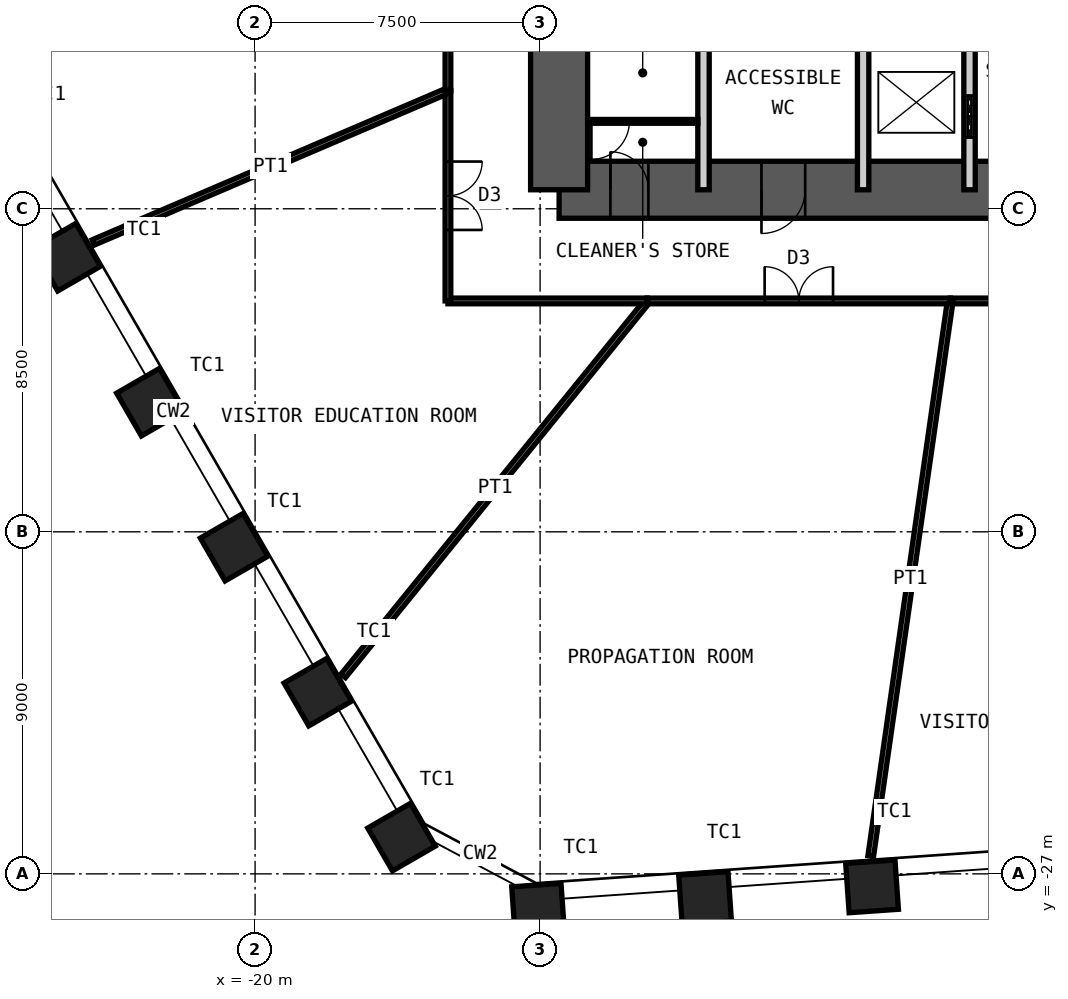
"""IFC4 building model, lengths in metres.
Left out: names, types, materials, properties, quantities, classifications, styles, units other than length and angle.
Written with IfcOpenShell. Run it as: python <this file> out.ifc"""

import sys

from ifc_helpers import new_model, si_unit, direction, frame, frame_2d, origin, origin_2d, place, context, subcontext, project, spatial, rectangle, hollow_rectangle, extrude, element, fill, save


model = new_model("IFC4")
c1 = context("Model", 3, precision=1e-05, world=origin(), true_north=direction((0.0, 1.0)))
c2 = subcontext(c1, "Body", "Model", "MODEL_VIEW")
j1 = project(units=[si_unit("LENGTHUNIT", "METRE"), si_unit("PLANEANGLEUNIT", "RADIAN")], contexts=[c1])
p1 = place(None, origin())
s1 = spatial("IfcSite", under=j1, at=p1, CompositionType="ELEMENT")
p2 = place(p1, origin())
s2 = spatial("IfcBuilding", under=s1, at=p2, CompositionType="ELEMENT")
p3 = place(p2, frame((0.0, 0.0, 22.0)))
s3 = spatial("IfcBuildingStorey", under=s2, at=p3, CompositionType="ELEMENT", Elevation=22.0)
for number, where, z_axis, x_axis in (
    (1, (-3.765, -27.329, 0.0), (0.0, 0.0, 1.0), (0.998, 0.07, 0.0)),
    (2, (-8.159, -27.636, 0.0), (0.0, 0.0, 1.0), (0.998, 0.07, 0.0)),
    (3, (-12.553, -27.944, 0.0), (0.0, 0.0, 1.0), (0.998, 0.07, 0.0)),
    (4, (-16.147, -26.033, 0.0), (0.0, 0.0, 1.0), (0.5, -0.866, 0.0)),
    (5, (-18.349, -22.218, 0.0), (0.0, 0.0, 1.0), (0.5, -0.866, 0.0)),
    (6, (-20.552, -18.404, 0.0), (0.0, 0.0, 1.0), (0.5, -0.866, 0.0)),
    (7, (-22.754, -14.589, 0.0), (0.0, 0.0, 1.0), (0.5, -0.866, 0.0)),
    (8, (-24.956, -10.775, 0.0), (0.0, 0.0, 1.0), (0.5, -0.866, 0.0)),
):
    element("IfcColumn", number, at=place(p3, frame(where, z_axis=z_axis, x_axis=x_axis)), inside=s3, PredefinedType="COLUMN", context=c2, shape_type="SweptSolid", body=[
        extrude(hollow_rectangle(XDim=1.3, YDim=1.3, WallThickness=0.1, at=origin_2d()), origin(), (0.0, 0.0, 1.0), 5.0),
    ])
p4 = place(p3, frame((-12.0, -9.0, 0.0), z_axis=(0.0, 0.0, 1.0), x_axis=(1.0, 0.0, 0.0)))
e9 = element("IfcWall", 9, at=p4, inside=s3, PredefinedType="SHEAR", context=c2, shape_type="SweptSolid", body=[
    extrude(rectangle(XDim=24.0, YDim=1.5, at=frame_2d((12.0, 0.0))), origin(), (0.0, 0.0, 1.0), 5.0),
])
p5 = place(p4, frame((1.35, 0.0, 0.0)))
e10 = element("IfcOpeningElement", 10, at=p5, cuts=e9, PredefinedType="OPENING", context=c2, shape_type="SweptSolid", body=[
    extrude(rectangle(XDim=1.0, YDim=2.1, at=frame_2d((0.5, 1.05))), frame((0.0, 0.76, 0.0), z_axis=(0.0, -1.0, 0.0), x_axis=(1.0, 0.0, 0.0)), (0.0, 0.0, 1.0), 1.52),
])
p6 = place(p4, frame((5.325, 0.0, 0.0)))
e11 = element("IfcOpeningElement", 11, at=p6, cuts=e9, PredefinedType="OPENING", context=c2, shape_type="SweptSolid", body=[
    extrude(rectangle(XDim=1.15, YDim=2.1, at=frame_2d((0.575, 1.05))), frame((0.0, 0.76, 0.0), z_axis=(0.0, -1.0, 0.0), x_axis=(1.0, 0.0, 0.0)), (0.0, 0.0, 1.0), 1.52),
])
p7 = place(p4, frame((12.6, 0.0, 0.0)))
e12 = element("IfcOpeningElement", 12, at=p7, cuts=e9, PredefinedType="OPENING", context=c2, shape_type="SweptSolid", body=[
    extrude(rectangle(XDim=1.0, YDim=2.1, at=frame_2d((0.5, 1.05))), frame((0.0, 0.76, 0.0), z_axis=(0.0, -1.0, 0.0), x_axis=(1.0, 0.0, 0.0)), (0.0, 0.0, 1.0), 1.52),
])
p8 = place(p3, frame((-12.0, -9.0, 0.0), z_axis=(0.0, 0.0, 1.0), x_axis=(0.0, 1.0, 0.0)))
e13 = element("IfcWall", 13, at=p8, inside=s3, PredefinedType="SHEAR", context=c2, shape_type="SweptSolid", body=[
    extrude(rectangle(XDim=18.0, YDim=1.5, at=frame_2d((9.0, 0.0))), origin(), (0.0, 0.0, 1.0), 5.0),
])
p9 = place(p8, frame((8.1, 0.0, 0.0)))
e14 = element("IfcOpeningElement", 14, at=p9, cuts=e13, PredefinedType="OPENING", context=c2, shape_type="SweptSolid", body=[
    extrude(rectangle(XDim=1.8, YDim=2.1, at=frame_2d((0.9, 1.05))), frame((0.0, 0.76, 0.0), z_axis=(0.0, -1.0, 0.0), x_axis=(1.0, 0.0, 0.0)), (0.0, 0.0, 1.0), 1.52),
])
for number, where, z_axis, x_axis in (
    (15, (-8.2, -9.0, 0.0), (0.0, 0.0, 1.0), (0.0, 1.0, 0.0)),
    (16, (-4.0, -9.0, 0.0), (0.0, 0.0, 1.0), (0.0, 1.0, 0.0)),
):
    element("IfcWall", number, at=place(p3, frame(where, z_axis=z_axis, x_axis=x_axis)), inside=s3, PredefinedType="PARTITIONING", context=c2, shape_type="SweptSolid", body=[
        extrude(rectangle(XDim=3.85, YDim=0.3, at=frame_2d((1.925, 0.0))), origin(), (0.0, 0.0, 1.0), 4.78),
    ])
p10 = place(p3, frame((-1.2, -9.0, 0.0), z_axis=(0.0, 0.0, 1.0), x_axis=(0.0, 1.0, 0.0)))
e17 = element("IfcWall", 17, at=p10, inside=s3, PredefinedType="PARTITIONING", context=c2, shape_type="SweptSolid", body=[
    extrude(rectangle(XDim=3.85, YDim=0.3, at=frame_2d((1.925, 0.0))), origin(), (0.0, 0.0, 1.0), 4.78),
])
p11 = place(p10, frame((1.375, 0.0, 0.0)))
e18 = element("IfcOpeningElement", 18, at=p11, cuts=e17, PredefinedType="OPENING", context=c2, shape_type="SweptSolid", body=[
    extrude(rectangle(XDim=1.1, YDim=2.4, at=frame_2d((0.55, 1.2))), frame((0.0, 0.16, 0.0), z_axis=(0.0, -1.0, 0.0), x_axis=(1.0, 0.0, 0.0)), (0.0, 0.0, 1.0), 0.32),
])
p12 = place(p3, frame((-11.25, -7.2, 0.0), z_axis=(0.0, 0.0, 1.0), x_axis=(1.0, 0.0, 0.0)))
e19 = element("IfcWall", 19, at=p12, inside=s3, PredefinedType="PARTITIONING", context=c2, shape_type="SweptSolid", body=[
    extrude(rectangle(XDim=2.9, YDim=0.1, at=frame_2d((1.45, 0.0))), origin(), (0.0, 0.0, 1.0), 4.78),
])
p13 = place(p12, frame((0.1, 0.0, 0.0)))
e20 = element("IfcOpeningElement", 20, at=p13, cuts=e19, PredefinedType="OPENING", context=c2, shape_type="SweptSolid", body=[
    extrude(rectangle(XDim=1.0, YDim=2.4, at=frame_2d((0.5, 1.2))), frame((0.0, 0.06, 0.0), z_axis=(0.0, -1.0, 0.0), x_axis=(1.0, 0.0, 0.0)), (0.0, 0.0, 1.0), 0.12),
])
p14 = place(p3, frame((-17.68, -21.791, 0.0), z_axis=(0.0, 0.0, 1.0), x_axis=(0.630056381531, 0.776549390633, 0.0)))
e21 = element("IfcWall", 21, at=p14, inside=s3, PredefinedType="PARTITIONING", context=c2, shape_type="SweptSolid", body=[
    extrude(rectangle(XDim=12.704, YDim=0.15, at=frame_2d((6.352, 0.0))), origin(), (0.0, 0.0, 1.0), 3.7),
])
p15 = place(p3, frame((-9.676, -11.925, 0.0), z_axis=(0.0, 0.0, 1.0), x_axis=(-1.0, 0.0, 0.0)))
e22 = element("IfcWall", 22, at=p15, inside=s3, PredefinedType="PARTITIONING", context=c2, shape_type="SweptSolid", body=[
    extrude(rectangle(XDim=5.25, YDim=0.15, at=frame_2d((2.625, 0.0))), origin(), (0.0, 0.0, 1.0), 4.8),
])
p16 = place(p3, frame((-14.925, -11.925, 0.0), z_axis=(0.0, 0.0, 1.0), x_axis=(0.0, 1.0, 0.0)))
e23 = element("IfcWall", 23, at=p16, inside=s3, PredefinedType="PARTITIONING", context=c2, shape_type="SweptSolid", body=[
    extrude(rectangle(XDim=5.535, YDim=0.15, at=frame_2d((2.768, 0.0))), origin(), (0.0, 0.0, 1.0), 4.8),
])
p17 = place(p16, frame((1.868, 0.0, 0.0)))
e24 = element("IfcOpeningElement", 24, at=p17, cuts=e23, PredefinedType="OPENING", context=c2, shape_type="SweptSolid", body=[
    extrude(rectangle(XDim=1.8, YDim=2.4, at=frame_2d((0.9, 1.2))), frame((0.0, 0.085, 0.0), z_axis=(0.0, -1.0, 0.0), x_axis=(1.0, 0.0, 0.0)), (0.0, 0.0, 1.0), 0.17),
])
p18 = place(p3, frame((-24.258, -10.385, 0.0), z_axis=(0.0, 0.0, 1.0), x_axis=(0.9192967113, 0.393565187222, 0.0)))
e25 = element("IfcWall", 25, at=p18, inside=s3, PredefinedType="PARTITIONING", context=c2, shape_type="SweptSolid", body=[
    extrude(rectangle(XDim=10.152, YDim=0.15, at=frame_2d((5.076, 0.0))), origin(), (0.0, 0.0, 1.0), 3.7),
])
p19 = place(p3, frame((-14.925, -6.39, 0.0), z_axis=(0.0, 0.0, 1.0), x_axis=(0.0, 1.0, 0.0)))
e26 = element("IfcWall", 26, at=p19, inside=s3, PredefinedType="PARTITIONING", context=c2, shape_type="SweptSolid", body=[
    extrude(rectangle(XDim=9.016, YDim=0.15, at=frame_2d((4.508, 0.0))), origin(), (0.0, 0.0, 1.0), 4.8),
])
p20 = place(p19, frame((3.608, 0.0, 0.0)))
e27 = element("IfcOpeningElement", 27, at=p20, cuts=e26, PredefinedType="OPENING", context=c2, shape_type="SweptSolid", body=[
    extrude(rectangle(XDim=1.8, YDim=2.4, at=frame_2d((0.9, 1.2))), frame((0.0, 0.085, 0.0), z_axis=(0.0, -1.0, 0.0), x_axis=(1.0, 0.0, 0.0)), (0.0, 0.0, 1.0), 0.17),
])
p21 = place(p3, frame((2.28, -11.925, 0.0), z_axis=(0.0, 0.0, 1.0), x_axis=(-1.0, 0.0, 0.0)))
e28 = element("IfcWall", 28, at=p21, inside=s3, PredefinedType="PARTITIONING", context=c2, shape_type="SweptSolid", body=[
    extrude(rectangle(XDim=3.988, YDim=0.15, at=frame_2d((1.994, 0.0))), origin(), (0.0, 0.0, 1.0), 4.8),
])
p22 = place(p21, frame((1.494, 0.0, 0.0)))
e29 = element("IfcOpeningElement", 29, at=p22, cuts=e28, PredefinedType="OPENING", context=c2, shape_type="SweptSolid", body=[
    extrude(rectangle(XDim=1.0, YDim=2.4, at=frame_2d((0.5, 1.2))), frame((0.0, 0.085, 0.0), z_axis=(0.0, -1.0, 0.0), x_axis=(1.0, 0.0, 0.0)), (0.0, 0.0, 1.0), 0.17),
])
p23 = place(p3, frame((-3.8, -26.532, 0.0), z_axis=(0.0, 0.0, 1.0), x_axis=(0.141775745175, 0.989898801939, 0.0)))
e30 = element("IfcWall", 30, at=p23, inside=s3, PredefinedType="PARTITIONING", context=c2, shape_type="SweptSolid", body=[
    extrude(rectangle(XDim=14.756, YDim=0.15, at=frame_2d((7.378, 0.0))), origin(), (0.0, 0.0, 1.0), 3.7),
])
p24 = place(p3, frame((-1.708, -11.925, 0.0), z_axis=(0.0, 0.0, 1.0), x_axis=(-1.0, 0.0, 0.0)))
e31 = element("IfcWall", 31, at=p24, inside=s3, PredefinedType="PARTITIONING", context=c2, shape_type="SweptSolid", body=[
    extrude(rectangle(XDim=7.968, YDim=0.15, at=frame_2d((3.984, 0.0))), origin(), (0.0, 0.0, 1.0), 4.8),
])
p25 = place(p24, frame((3.084, 0.0, 0.0)))
e32 = element("IfcOpeningElement", 32, at=p25, cuts=e31, PredefinedType="OPENING", context=c2, shape_type="SweptSolid", body=[
    extrude(rectangle(XDim=1.8, YDim=2.4, at=frame_2d((0.9, 1.2))), frame((0.0, 0.085, 0.0), z_axis=(0.0, -1.0, 0.0), x_axis=(1.0, 0.0, 0.0)), (0.0, 0.0, 1.0), 0.17),
])
p26 = place(p5, origin())
e33 = element("IfcDoor", 33, at=p26, inside=s3, OperationType="SINGLE_SWING_RIGHT", PredefinedType="DOOR", context=c2, shape_type="SweptSolid", body=[
    extrude(rectangle(XDim=1.0, YDim=2.1, at=frame_2d((0.5, 1.05))), frame((0.0, 0.025, 0.0), z_axis=(0.0, -1.0, 0.0), x_axis=(1.0, 0.0, 0.0)), (0.0, 0.0, 1.0), 0.05),
])
fill(e10, e33)
p27 = place(p6, origin())
e34 = element("IfcDoor", 34, at=p27, inside=s3, OperationType="SINGLE_SWING_LEFT", PredefinedType="DOOR", context=c2, shape_type="SweptSolid", body=[
    extrude(rectangle(XDim=1.15, YDim=2.1, at=frame_2d((0.575, 1.05))), frame((0.0, 0.025, 0.0), z_axis=(0.0, -1.0, 0.0), x_axis=(1.0, 0.0, 0.0)), (0.0, 0.0, 1.0), 0.05),
])
fill(e11, e34)
p28 = place(p11, origin())
e35 = element("IfcDoor", 35, at=p28, inside=s3, OperationType="DOUBLE_DOOR_SLIDING", PredefinedType="DOOR", context=c2, shape_type="SweptSolid", body=[
    extrude(rectangle(XDim=1.1, YDim=2.4, at=frame_2d((0.55, 1.2))), frame((0.0, 0.025, 0.0), z_axis=(0.0, -1.0, 0.0), x_axis=(1.0, 0.0, 0.0)), (0.0, 0.0, 1.0), 0.05),
])
fill(e18, e35)
p29 = place(p13, origin())
e36 = element("IfcDoor", 36, at=p29, inside=s3, OperationType="SINGLE_SWING_LEFT", PredefinedType="DOOR", context=c2, shape_type="SweptSolid", body=[
    extrude(rectangle(XDim=1.0, YDim=2.4, at=frame_2d((0.5, 1.2))), frame((0.0, 0.025, 0.0), z_axis=(0.0, -1.0, 0.0), x_axis=(1.0, 0.0, 0.0)), (0.0, 0.0, 1.0), 0.05),
])
fill(e20, e36)
p30 = place(p17, origin())
e37 = element("IfcDoor", 37, at=p30, inside=s3, OperationType="DOUBLE_DOOR_DOUBLE_SWING", PredefinedType="DOOR", context=c2, shape_type="SweptSolid", body=[
    extrude(rectangle(XDim=1.8, YDim=2.4, at=frame_2d((0.9, 1.2))), frame((0.0, 0.025, 0.0), z_axis=(0.0, -1.0, 0.0), x_axis=(1.0, 0.0, 0.0)), (0.0, 0.0, 1.0), 0.05),
])
fill(e24, e37)
p31 = place(p25, origin())
e38 = element("IfcDoor", 38, at=p31, inside=s3, OperationType="DOUBLE_DOOR_DOUBLE_SWING", PredefinedType="DOOR", context=c2, shape_type="SweptSolid", body=[
    extrude(rectangle(XDim=1.8, YDim=2.4, at=frame_2d((0.9, 1.2))), frame((0.0, 0.025, 0.0), z_axis=(0.0, -1.0, 0.0), x_axis=(1.0, 0.0, 0.0)), (0.0, 0.0, 1.0), 0.05),
])
fill(e32, e38)
save(model, sys.argv[1])
